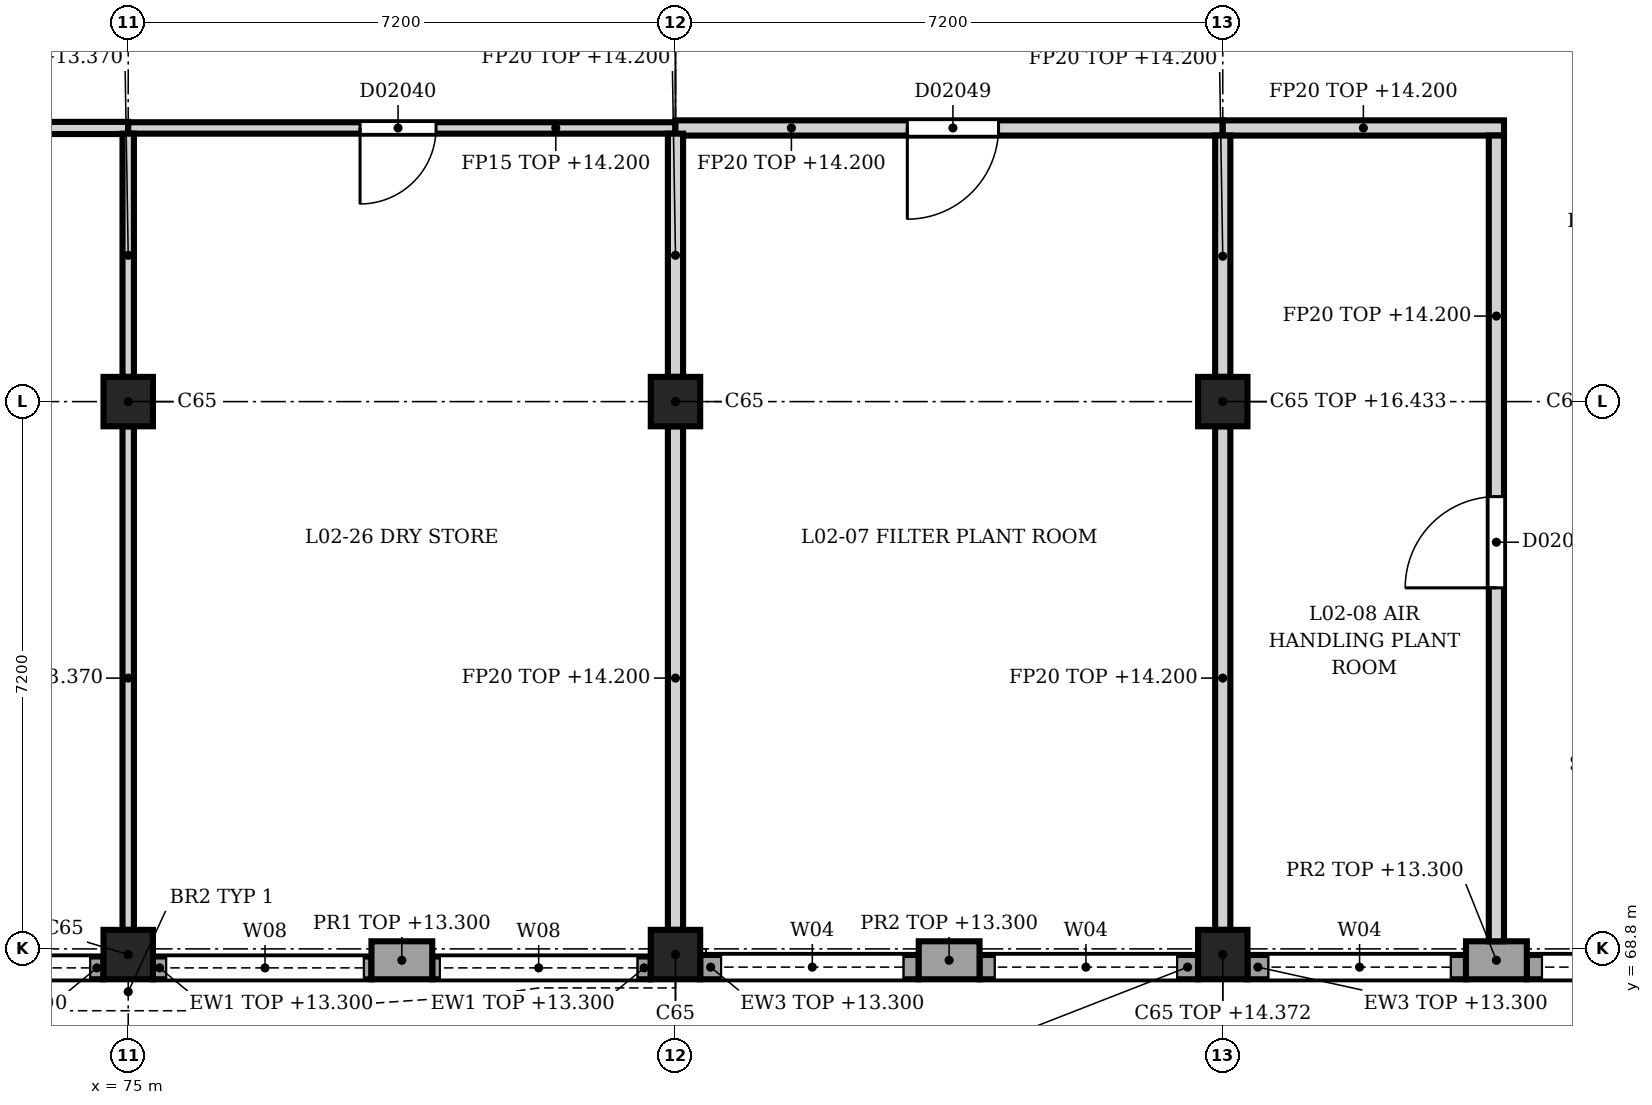
"""IFC4 building model, lengths in metres.
Left out: names, types, materials, properties, quantities, classifications, styles, units other than length and angle.
Written with IfcOpenShell. Run it as: python <this file> out.ifc"""

import sys

from ifc_helpers import new_model, si_unit, direction, frame, frame_2d, origin, origin_2d, place, context, subcontext, project, spatial, rectangle, extrude, element, fill, save


model = new_model("IFC4")
c1 = context("Model", 3, precision=1e-05, world=origin(), true_north=direction((0.0, 1.0)))
c2 = subcontext(c1, "Body", "Model", "MODEL_VIEW")
j1 = project(units=[si_unit("LENGTHUNIT", "METRE"), si_unit("PLANEANGLEUNIT", "RADIAN")], contexts=[c1])
p1 = place(None, origin())
s1 = spatial("IfcSite", under=j1, at=p1, CompositionType="ELEMENT")
p2 = place(p1, origin())
s2 = spatial("IfcBuilding", under=s1, at=p2, CompositionType="ELEMENT")
p3 = place(p2, frame((0.0, 0.0, 9.9)))
s3 = spatial("IfcBuildingStorey", under=s2, at=p3, CompositionType="ELEMENT", Elevation=9.9)
for number, where, z_axis, x_axis in (
    (1, (75.0, 68.725, 0.0), (0.0, 0.0, 1.0), (1.0, 0.0, 0.0)),
    (2, (75.0, 76.0, 0.0), (0.0, 0.0, 1.0), (1.0, 0.0, 0.0)),
    (3, (82.2, 68.725, 0.0), (0.0, 0.0, 1.0), (1.0, 0.0, 0.0)),
    (4, (82.2, 76.0, 0.0), (0.0, 0.0, 1.0), (1.0, 0.0, 0.0)),
):
    element("IfcColumn", number, at=place(p3, frame(where, z_axis=z_axis, x_axis=x_axis)), inside=s3, PredefinedType="COLUMN", context=c2, shape_type="SweptSolid", body=[
        extrude(rectangle(XDim=0.65, YDim=0.65, at=origin_2d()), origin(), (0.0, 0.0, 1.0), 4.5),
    ])
p4 = place(p3, frame((89.4, 68.725, 0.0), z_axis=(0.0, 0.0, 1.0), x_axis=(1.0, 0.0, 0.0)))
e5 = element("IfcColumn", 5, at=p4, inside=s3, PredefinedType="COLUMN", context=c2, shape_type="SweptSolid", body=[
    extrude(rectangle(XDim=0.65, YDim=0.65, at=origin_2d()), origin(), (0.0, 0.0, 1.0), 4.472),
])
p5 = place(p3, frame((89.4, 76.0, 0.0), z_axis=(0.0, 0.0, 1.0), x_axis=(1.0, 0.0, 0.0)))
e6 = element("IfcColumn", 6, at=p5, inside=s3, PredefinedType="COLUMN", context=c2, shape_type="SweptSolid", body=[
    extrude(rectangle(XDim=0.65, YDim=0.65, at=origin_2d()), origin(), (0.0, 0.0, 1.0), 6.533),
])
p6 = place(p3, frame((93.4, 68.65, 0.0), z_axis=(0.0, 0.0, 1.0), x_axis=(-1.0, 0.0, 0.0)))
e7 = element("IfcWall", 7, at=p6, inside=s3, PredefinedType="SOLIDWALL", context=c2, shape_type="SweptSolid", body=[
    extrude(rectangle(XDim=0.8, YDim=0.5, at=frame_2d((0.4, 0.0))), origin(), (0.0, 0.0, 1.0), 3.4),
])
p7 = place(p3, frame((86.2, 68.65, 0.0), z_axis=(0.0, 0.0, 1.0), x_axis=(-1.0, 0.0, 0.0)))
e8 = element("IfcWall", 8, at=p7, inside=s3, PredefinedType="SOLIDWALL", context=c2, shape_type="SweptSolid", body=[
    extrude(rectangle(XDim=0.8, YDim=0.5, at=frame_2d((0.4, 0.0))), origin(), (0.0, 0.0, 1.0), 3.4),
])
p8 = place(p3, frame((96.275, 68.56, 0.0), z_axis=(0.0, 0.0, 1.0), x_axis=(-1.0, 0.0, 0.0)))
e9 = element("IfcWall", 9, at=p8, inside=s3, PredefinedType="SOLIDWALL", context=c2, shape_type="SweptSolid", body=[
    extrude(rectangle(XDim=2.875, YDim=0.32, at=frame_2d((1.438, 0.0))), origin(), (0.0, 0.0, 1.0), 3.4),
])
p9 = place(p8, frame((0.275, 0.0, 1.9)))
e10 = element("IfcOpeningElement", 10, at=p9, cuts=e9, PredefinedType="OPENING", context=c2, shape_type="SweptSolid", body=[
    extrude(rectangle(XDim=2.4, YDim=1.2, at=frame_2d((1.2, 0.6))), frame((0.0, 0.17, 0.0), z_axis=(0.0, -1.0, 0.0), x_axis=(1.0, 0.0, 0.0)), (0.0, 0.0, 1.0), 0.34),
])
p10 = place(p3, frame((92.6, 68.56, 0.0), z_axis=(0.0, 0.0, 1.0), x_axis=(-1.0, 0.0, 0.0)))
e11 = element("IfcWall", 11, at=p10, inside=s3, PredefinedType="SOLIDWALL", context=c2, shape_type="SweptSolid", body=[
    extrude(rectangle(XDim=2.875, YDim=0.32, at=frame_2d((1.438, 0.0))), origin(), (0.0, 0.0, 1.0), 3.4),
])
p11 = place(p10, frame((0.2, 0.0, 1.9)))
e12 = element("IfcOpeningElement", 12, at=p11, cuts=e11, PredefinedType="OPENING", context=c2, shape_type="SweptSolid", body=[
    extrude(rectangle(XDim=2.4, YDim=1.2, at=frame_2d((1.2, 0.6))), frame((0.0, 0.17, 0.0), z_axis=(0.0, -1.0, 0.0), x_axis=(1.0, 0.0, 0.0)), (0.0, 0.0, 1.0), 0.34),
])
p12 = place(p3, frame((89.075, 68.56, 0.0), z_axis=(0.0, 0.0, 1.0), x_axis=(-1.0, 0.0, 0.0)))
e13 = element("IfcWall", 13, at=p12, inside=s3, PredefinedType="SOLIDWALL", context=c2, shape_type="SweptSolid", body=[
    extrude(rectangle(XDim=2.875, YDim=0.32, at=frame_2d((1.438, 0.0))), origin(), (0.0, 0.0, 1.0), 3.4),
])
p13 = place(p12, frame((0.275, 0.0, 1.9)))
e14 = element("IfcOpeningElement", 14, at=p13, cuts=e13, PredefinedType="OPENING", context=c2, shape_type="SweptSolid", body=[
    extrude(rectangle(XDim=2.4, YDim=1.2, at=frame_2d((1.2, 0.6))), frame((0.0, 0.17, 0.0), z_axis=(0.0, -1.0, 0.0), x_axis=(1.0, 0.0, 0.0)), (0.0, 0.0, 1.0), 0.34),
])
p14 = place(p3, frame((85.4, 68.56, 0.0), z_axis=(0.0, 0.0, 1.0), x_axis=(-1.0, 0.0, 0.0)))
e15 = element("IfcWall", 15, at=p14, inside=s3, PredefinedType="SOLIDWALL", context=c2, shape_type="SweptSolid", body=[
    extrude(rectangle(XDim=2.875, YDim=0.32, at=frame_2d((1.438, 0.0))), origin(), (0.0, 0.0, 1.0), 3.4),
])
p15 = place(p14, frame((0.2, 0.0, 1.9)))
e16 = element("IfcOpeningElement", 16, at=p15, cuts=e15, PredefinedType="OPENING", context=c2, shape_type="SweptSolid", body=[
    extrude(rectangle(XDim=2.4, YDim=1.2, at=frame_2d((1.2, 0.6))), frame((0.0, 0.17, 0.0), z_axis=(0.0, -1.0, 0.0), x_axis=(1.0, 0.0, 0.0)), (0.0, 0.0, 1.0), 0.34),
])
p16 = place(p3, frame((79.0, 68.65, 0.0), z_axis=(0.0, 0.0, 1.0), x_axis=(-1.0, 0.0, 0.0)))
e17 = element("IfcWall", 17, at=p16, inside=s3, PredefinedType="SOLIDWALL", context=c2, shape_type="SweptSolid", body=[
    extrude(rectangle(XDim=0.8, YDim=0.5, at=frame_2d((0.4, 0.0))), origin(), (0.0, 0.0, 1.0), 3.4),
])
p17 = place(p3, frame((81.875, 68.55, 0.0), z_axis=(0.0, 0.0, 1.0), x_axis=(-1.0, 0.0, 0.0)))
e18 = element("IfcWall", 18, at=p17, inside=s3, PredefinedType="SOLIDWALL", context=c2, shape_type="SweptSolid", body=[
    extrude(rectangle(XDim=2.875, YDim=0.3, at=frame_2d((1.438, 0.0))), origin(), (0.0, 0.0, 1.0), 3.4),
])
p18 = place(p17, frame((0.175, 0.0, 1.2)))
e19 = element("IfcOpeningElement", 19, at=p18, cuts=e18, PredefinedType="OPENING", context=c2, shape_type="SweptSolid", body=[
    extrude(rectangle(XDim=2.6, YDim=2.1, at=frame_2d((1.3, 1.05))), frame((0.0, 0.16, 0.0), z_axis=(0.0, -1.0, 0.0), x_axis=(1.0, 0.0, 0.0)), (0.0, 0.0, 1.0), 0.32),
])
p19 = place(p3, frame((78.2, 68.55, 0.0), z_axis=(0.0, 0.0, 1.0), x_axis=(-1.0, 0.0, 0.0)))
e20 = element("IfcWall", 20, at=p19, inside=s3, PredefinedType="SOLIDWALL", context=c2, shape_type="SweptSolid", body=[
    extrude(rectangle(XDim=2.875, YDim=0.3, at=frame_2d((1.438, 0.0))), origin(), (0.0, 0.0, 1.0), 3.4),
])
p20 = place(p19, frame((0.1, 0.0, 1.2)))
e21 = element("IfcOpeningElement", 21, at=p20, cuts=e20, PredefinedType="OPENING", context=c2, shape_type="SweptSolid", body=[
    extrude(rectangle(XDim=2.6, YDim=2.1, at=frame_2d((1.3, 1.05))), frame((0.0, 0.16, 0.0), z_axis=(0.0, -1.0, 0.0), x_axis=(1.0, 0.0, 0.0)), (0.0, 0.0, 1.0), 0.32),
])
p21 = place(p3, frame((74.675, 68.55, 0.0), z_axis=(0.0, 0.0, 1.0), x_axis=(-1.0, 0.0, 0.0)))
e22 = element("IfcWall", 22, at=p21, inside=s3, PredefinedType="SOLIDWALL", context=c2, shape_type="SweptSolid", body=[
    extrude(rectangle(XDim=2.875, YDim=0.3, at=frame_2d((1.438, 0.0))), origin(), (0.0, 0.0, 1.0), 3.4),
])
p22 = place(p21, frame((0.175, 0.0, 1.2)))
e23 = element("IfcOpeningElement", 23, at=p22, cuts=e22, PredefinedType="OPENING", context=c2, shape_type="SweptSolid", body=[
    extrude(rectangle(XDim=2.6, YDim=2.1, at=frame_2d((1.3, 1.05))), frame((0.0, 0.16, 0.0), z_axis=(0.0, -1.0, 0.0), x_axis=(1.0, 0.0, 0.0)), (0.0, 0.0, 1.0), 0.32),
])
p23 = place(p3, frame((75.0, 79.6, 0.0), z_axis=(0.0, 0.0, 1.0), x_axis=(-1.0, 0.0, 0.0)))
e24 = element("IfcWall", 24, at=p23, inside=s3, PredefinedType="PARTITIONING", context=c2, shape_type="SweptSolid", body=[
    extrude(rectangle(XDim=7.2, YDim=0.16, at=frame_2d((3.6, 0.0))), origin(), (0.0, 0.0, 1.0), 4.3),
])
p24 = place(p23, frame((2.95, 0.0, 0.0)))
e25 = element("IfcOpeningElement", 25, at=p24, cuts=e24, PredefinedType="OPENING", context=c2, shape_type="SweptSolid", body=[
    extrude(rectangle(XDim=1.3, YDim=2.2, at=frame_2d((0.65, 1.1))), frame((0.0, 0.09, 0.0), z_axis=(0.0, -1.0, 0.0), x_axis=(1.0, 0.0, 0.0)), (0.0, 0.0, 1.0), 0.18),
])
p25 = place(p3, frame((82.2, 79.6, 0.0), z_axis=(0.0, 0.0, 1.0), x_axis=(-1.0, 0.0, 0.0)))
e26 = element("IfcWall", 26, at=p25, inside=s3, PredefinedType="PARTITIONING", context=c2, shape_type="SweptSolid", body=[
    extrude(rectangle(XDim=7.2, YDim=0.15, at=frame_2d((3.6, 0.0))), origin(), (0.0, 0.0, 1.0), 4.3),
])
p26 = place(p25, frame((3.15, 0.0, 0.0)))
e27 = element("IfcOpeningElement", 27, at=p26, cuts=e26, PredefinedType="OPENING", context=c2, shape_type="SweptSolid", body=[
    extrude(rectangle(XDim=1.0, YDim=2.1, at=frame_2d((0.5, 1.05))), frame((0.0, 0.085, 0.0), z_axis=(0.0, -1.0, 0.0), x_axis=(1.0, 0.0, 0.0)), (0.0, 0.0, 1.0), 0.17),
])
p27 = place(p3, frame((89.4, 79.6, 0.0), z_axis=(0.0, 0.0, 1.0), x_axis=(-1.0, 0.0, 0.0)))
e28 = element("IfcWall", 28, at=p27, inside=s3, PredefinedType="PARTITIONING", context=c2, shape_type="SweptSolid", body=[
    extrude(rectangle(XDim=7.2, YDim=0.2, at=frame_2d((3.6, 0.0))), origin(), (0.0, 0.0, 1.0), 4.3),
])
p28 = place(p27, frame((2.95, 0.0, 0.0)))
e29 = element("IfcOpeningElement", 29, at=p28, cuts=e28, PredefinedType="OPENING", context=c2, shape_type="SweptSolid", body=[
    extrude(rectangle(XDim=1.2, YDim=2.3, at=frame_2d((0.6, 1.15))), frame((0.0, 0.11, 0.0), z_axis=(0.0, -1.0, 0.0), x_axis=(1.0, 0.0, 0.0)), (0.0, 0.0, 1.0), 0.22),
])
p29 = place(p3, frame((89.4, 79.6, 0.0), z_axis=(0.0, 0.0, 1.0), x_axis=(1.0, 0.0, 0.0)))
e30 = element("IfcWall", 30, at=p29, inside=s3, PredefinedType="PARTITIONING", context=c2, shape_type="SweptSolid", body=[
    extrude(rectangle(XDim=3.7, YDim=0.2, at=frame_2d((1.85, 0.0))), origin(), (0.0, 0.0, 1.0), 4.3),
])
p30 = place(p3, frame((75.0, 69.05, 0.0), z_axis=(0.0, 0.0, 1.0), x_axis=(0.0, 1.0, 0.0)))
e31 = element("IfcWall", 31, at=p30, inside=s3, PredefinedType="PARTITIONING", context=c2, shape_type="SweptSolid", body=[
    extrude(rectangle(XDim=6.625, YDim=0.15, at=frame_2d((3.312, 0.0))), origin(), (0.0, 0.0, 1.0), 3.47),
])
p31 = place(p3, frame((75.0, 76.325, 0.0), z_axis=(0.0, 0.0, 1.0), x_axis=(0.0, 1.0, 0.0)))
e32 = element("IfcWall", 32, at=p31, inside=s3, PredefinedType="PARTITIONING", context=c2, shape_type="SweptSolid", body=[
    extrude(rectangle(XDim=3.2, YDim=0.15, at=frame_2d((1.6, 0.0))), origin(), (0.0, 0.0, 1.0), 3.47),
])
p32 = place(p3, frame((82.2, 69.05, 0.0), z_axis=(0.0, 0.0, 1.0), x_axis=(0.0, 1.0, 0.0)))
e33 = element("IfcWall", 33, at=p32, inside=s3, PredefinedType="PARTITIONING", context=c2, shape_type="SweptSolid", body=[
    extrude(rectangle(XDim=6.625, YDim=0.2, at=frame_2d((3.312, 0.0))), origin(), (0.0, 0.0, 1.0), 4.3),
])
p33 = place(p3, frame((82.2, 76.325, 0.0), z_axis=(0.0, 0.0, 1.0), x_axis=(0.0, 1.0, 0.0)))
e34 = element("IfcWall", 34, at=p33, inside=s3, PredefinedType="PARTITIONING", context=c2, shape_type="SweptSolid", body=[
    extrude(rectangle(XDim=3.2, YDim=0.2, at=frame_2d((1.6, 0.0))), origin(), (0.0, 0.0, 1.0), 4.3),
])
p34 = place(p3, frame((89.4, 69.05, 0.0), z_axis=(0.0, 0.0, 1.0), x_axis=(0.0, 1.0, 0.0)))
e35 = element("IfcWall", 35, at=p34, inside=s3, PredefinedType="PARTITIONING", context=c2, shape_type="SweptSolid", body=[
    extrude(rectangle(XDim=6.625, YDim=0.2, at=frame_2d((3.312, 0.0))), origin(), (0.0, 0.0, 1.0), 4.3),
])
p35 = place(p3, frame((89.4, 76.325, 0.0), z_axis=(0.0, 0.0, 1.0), x_axis=(0.0, 1.0, 0.0)))
e36 = element("IfcWall", 36, at=p35, inside=s3, PredefinedType="PARTITIONING", context=c2, shape_type="SweptSolid", body=[
    extrude(rectangle(XDim=3.175, YDim=0.2, at=frame_2d((1.587, 0.0))), origin(), (0.0, 0.0, 1.0), 4.3),
])
p36 = place(p3, frame((93.0, 68.9, 0.0), z_axis=(0.0, 0.0, 1.0), x_axis=(0.0, 1.0, 0.0)))
e37 = element("IfcWall", 37, at=p36, inside=s3, PredefinedType="PARTITIONING", context=c2, shape_type="SweptSolid", body=[
    extrude(rectangle(XDim=10.6, YDim=0.2, at=frame_2d((5.3, 0.0))), origin(), (0.0, 0.0, 1.0), 4.3),
])
p37 = place(p36, frame((4.65, 0.0, 0.0)))
e38 = element("IfcOpeningElement", 38, at=p37, cuts=e37, PredefinedType="OPENING", context=c2, shape_type="SweptSolid", body=[
    extrude(rectangle(XDim=1.2, YDim=2.3, at=frame_2d((0.6, 1.15))), frame((0.0, 0.11, 0.0), z_axis=(0.0, -1.0, 0.0), x_axis=(1.0, 0.0, 0.0)), (0.0, 0.0, 1.0), 0.22),
])
p38 = place(p9, origin())
e39 = element("IfcWindow", 39, at=p38, inside=s3, PartitioningType="SINGLE_PANEL", PredefinedType="WINDOW", context=c2, shape_type="SweptSolid", body=[
    extrude(rectangle(XDim=2.4, YDim=1.2, at=frame_2d((1.2, 0.6))), frame((0.0, 0.03, 0.0), z_axis=(0.0, -1.0, 0.0), x_axis=(1.0, 0.0, 0.0)), (0.0, 0.0, 1.0), 0.06),
])
fill(e10, e39)
p39 = place(p11, origin())
e40 = element("IfcWindow", 40, at=p39, inside=s3, PartitioningType="SINGLE_PANEL", PredefinedType="WINDOW", context=c2, shape_type="SweptSolid", body=[
    extrude(rectangle(XDim=2.4, YDim=1.2, at=frame_2d((1.2, 0.6))), frame((0.0, 0.03, 0.0), z_axis=(0.0, -1.0, 0.0), x_axis=(1.0, 0.0, 0.0)), (0.0, 0.0, 1.0), 0.06),
])
fill(e12, e40)
p40 = place(p13, origin())
e41 = element("IfcWindow", 41, at=p40, inside=s3, PartitioningType="SINGLE_PANEL", PredefinedType="WINDOW", context=c2, shape_type="SweptSolid", body=[
    extrude(rectangle(XDim=2.4, YDim=1.2, at=frame_2d((1.2, 0.6))), frame((0.0, 0.03, 0.0), z_axis=(0.0, -1.0, 0.0), x_axis=(1.0, 0.0, 0.0)), (0.0, 0.0, 1.0), 0.06),
])
fill(e14, e41)
p41 = place(p15, origin())
e42 = element("IfcWindow", 42, at=p41, inside=s3, PartitioningType="SINGLE_PANEL", PredefinedType="WINDOW", context=c2, shape_type="SweptSolid", body=[
    extrude(rectangle(XDim=2.4, YDim=1.2, at=frame_2d((1.2, 0.6))), frame((0.0, 0.03, 0.0), z_axis=(0.0, -1.0, 0.0), x_axis=(1.0, 0.0, 0.0)), (0.0, 0.0, 1.0), 0.06),
])
fill(e16, e42)
p42 = place(p18, origin())
e43 = element("IfcWindow", 43, at=p42, inside=s3, PartitioningType="SINGLE_PANEL", PredefinedType="WINDOW", context=c2, shape_type="SweptSolid", body=[
    extrude(rectangle(XDim=2.6, YDim=2.1, at=frame_2d((1.3, 1.05))), frame((0.0, 0.03, 0.0), z_axis=(0.0, -1.0, 0.0), x_axis=(1.0, 0.0, 0.0)), (0.0, 0.0, 1.0), 0.06),
])
fill(e19, e43)
p43 = place(p20, origin())
e44 = element("IfcWindow", 44, at=p43, inside=s3, PartitioningType="SINGLE_PANEL", PredefinedType="WINDOW", context=c2, shape_type="SweptSolid", body=[
    extrude(rectangle(XDim=2.6, YDim=2.1, at=frame_2d((1.3, 1.05))), frame((0.0, 0.03, 0.0), z_axis=(0.0, -1.0, 0.0), x_axis=(1.0, 0.0, 0.0)), (0.0, 0.0, 1.0), 0.06),
])
fill(e21, e44)
p44 = place(p22, origin())
e45 = element("IfcWindow", 45, at=p44, inside=s3, PartitioningType="SINGLE_PANEL", PredefinedType="WINDOW", context=c2, shape_type="SweptSolid", body=[
    extrude(rectangle(XDim=2.6, YDim=2.1, at=frame_2d((1.3, 1.05))), frame((0.0, 0.03, 0.0), z_axis=(0.0, -1.0, 0.0), x_axis=(1.0, 0.0, 0.0)), (0.0, 0.0, 1.0), 0.06),
])
fill(e23, e45)
p45 = place(p26, origin())
e46 = element("IfcDoor", 46, at=p45, inside=s3, OperationType="SINGLE_SWING_RIGHT", PredefinedType="DOOR", context=c2, shape_type="SweptSolid", body=[
    extrude(rectangle(XDim=1.0, YDim=2.1, at=frame_2d((0.5, 1.05))), frame((0.0, 0.025, 0.0), z_axis=(0.0, -1.0, 0.0), x_axis=(1.0, 0.0, 0.0)), (0.0, 0.0, 1.0), 0.05),
])
fill(e27, e46)
p46 = place(p28, origin())
e47 = element("IfcDoor", 47, at=p46, inside=s3, OperationType="SINGLE_SWING_LEFT", PredefinedType="DOOR", context=c2, shape_type="SweptSolid", body=[
    extrude(rectangle(XDim=1.2, YDim=2.3, at=frame_2d((0.6, 1.15))), frame((0.0, 0.025, 0.0), z_axis=(0.0, -1.0, 0.0), x_axis=(1.0, 0.0, 0.0)), (0.0, 0.0, 1.0), 0.05),
])
fill(e29, e47)
p47 = place(p37, origin())
e48 = element("IfcDoor", 48, at=p47, inside=s3, OperationType="SINGLE_SWING_LEFT", PredefinedType="DOOR", context=c2, shape_type="SweptSolid", body=[
    extrude(rectangle(XDim=1.2, YDim=2.3, at=frame_2d((0.6, 1.15))), frame((0.0, 0.025, 0.0), z_axis=(0.0, -1.0, 0.0), x_axis=(1.0, 0.0, 0.0)), (0.0, 0.0, 1.0), 0.05),
])
fill(e38, e48)
save(model, sys.argv[1])
